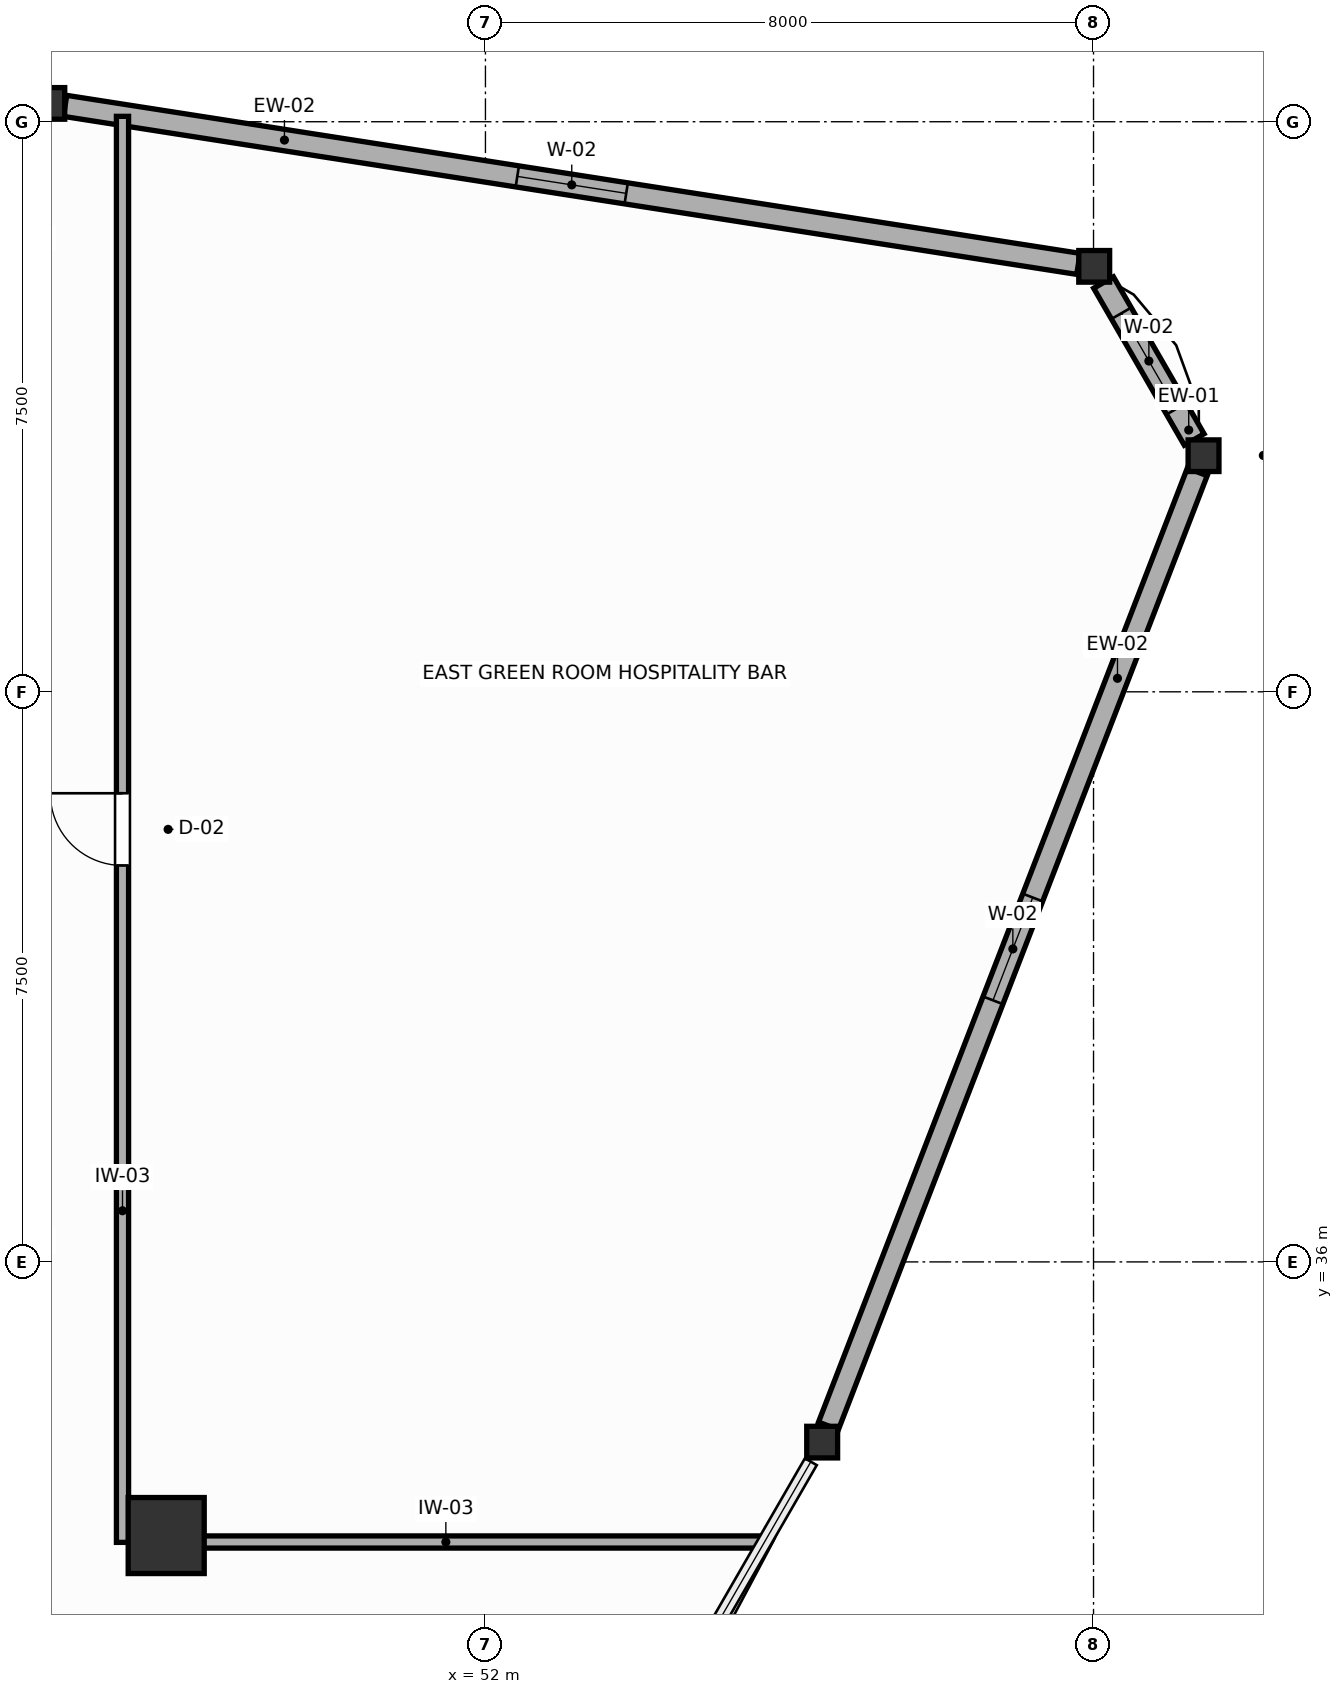
"""IFC4 building model, lengths in metres.
Left out: names, types, materials, properties, quantities, classifications, styles, units other than length and angle.
Written with IfcOpenShell. Run it as: python <this file> out.ifc"""

import sys

from ifc_helpers import new_model, si_unit, direction, frame, frame_2d, origin, origin_2d, place, context, subcontext, project, spatial, rectangle, i_section, extrude, source, transform, mapped, element, fill, save


model = new_model("IFC4")
c1 = context("Model", 3, precision=1e-05, world=origin(), true_north=direction((0.0, 1.0)))
c2 = subcontext(c1, "Body", "Model", "MODEL_VIEW")
j1 = project(units=[si_unit("LENGTHUNIT", "METRE"), si_unit("PLANEANGLEUNIT", "RADIAN")], contexts=[c1])
p1 = place(None, origin())
s1 = spatial("IfcSite", under=j1, at=p1, CompositionType="ELEMENT")
p2 = place(p1, origin())
s2 = spatial("IfcBuilding", under=s1, at=p2, CompositionType="ELEMENT")
p3 = place(p2, frame((0.0, 0.0, 227.4)))
s3 = spatial("IfcBuildingStorey", under=s2, at=p3, CompositionType="ELEMENT", Elevation=227.4)
m1 = source(origin(), c2, "Body", "SweptSolid", [
    extrude(rectangle(XDim=1.0, YDim=1.0, at=origin_2d()), origin(), (0.0, 0.0, 1.0), 3.6),
])
p4 = place(p3, frame((47.8, 32.4, 0.0), z_axis=(0.0, 0.0, 1.0), x_axis=(1.0, 0.0, 0.0)))
e1 = element("IfcColumn", 1, at=p4, inside=s3, PredefinedType="COLUMN", context=c2, shape_type="MappedRepresentation", body=[
    mapped(m1, transform((0.0, 0.0, 0.0), scale=1.0)),
])
m2 = source(origin(), c2, "Body", "SweptSolid", [
    extrude(i_section(OverallWidth=0.406, OverallDepth=0.416, WebThickness=0.027, FlangeThickness=0.044, FilletRadius=0.015, at=origin_2d()), origin(), (0.0, 0.0, 1.0), 3.6),
])
for number, where, z_axis, x_axis in (
    (2, (61.447, 46.606, 0.0), (0.0, 0.0, 1.0), (1.0, 0.0, 0.0)),
    (3, (60.009, 49.098, 0.0), (0.0, 0.0, 1.0), (1.0, 0.0, 0.0)),
    (4, (46.262, 51.241, 0.0), (0.0, 0.0, 1.0), (1.0, 0.0, 0.0)),
    (5, (56.43, 33.629, 0.0), (0.0, 0.0, 1.0), (1.0, 0.0, 0.0)),
):
    element("IfcColumn", number, at=place(p3, frame(where, z_axis=z_axis, x_axis=x_axis)), inside=s3, PredefinedType="COLUMN", context=c2, shape_type="MappedRepresentation", body=[
        mapped(m2, transform((0.0, 0.0, 0.0), scale=1.0)),
    ])
p5 = place(p3, frame((61.324, 46.819, 0.0), z_axis=(0.0, 0.0, 1.0), x_axis=(-0.499938113561, 0.866061130988, 0.0)))
e6 = element("IfcWall", 6, at=p5, inside=s3, PredefinedType="SOLIDWALL", context=c2, shape_type="SweptSolid", body=[
    extrude(rectangle(XDim=2.385, YDim=0.3, at=frame_2d((1.192, 0.0))), origin(), (0.0, 0.0, 1.0), 3.02),
])
p6 = place(p5, frame((0.467, 0.0, 0.75)))
e7 = element("IfcOpeningElement", 7, at=p6, cuts=e6, PredefinedType="OPENING", context=c2, shape_type="SweptSolid", body=[
    extrude(rectangle(XDim=1.45, YDim=1.65, at=frame_2d((0.725, 0.825))), frame((0.0, 0.16, 0.0), z_axis=(0.0, -1.0, 0.0), x_axis=(1.0, 0.0, 0.0)), (0.0, 0.0, 1.0), 0.32),
])
p7 = place(p3, frame((59.801, 49.13, 0.0), z_axis=(0.0, 0.0, 1.0), x_axis=(-0.988058992674, 0.154076042901, 0.0)))
e8 = element("IfcWall", 8, at=p7, inside=s3, PredefinedType="SOLIDWALL", context=c2, shape_type="SweptSolid", body=[
    extrude(rectangle(XDim=13.492, YDim=0.28, at=frame_2d((6.746, 0.0))), origin(), (0.0, 0.0, 1.0), 3.02),
])
p8 = place(p7, frame((6.021, 0.0, 0.75)))
e9 = element("IfcOpeningElement", 9, at=p8, cuts=e8, PredefinedType="OPENING", context=c2, shape_type="SweptSolid", body=[
    extrude(rectangle(XDim=1.45, YDim=1.65, at=frame_2d((0.725, 0.825))), frame((0.0, 0.15, 0.0), z_axis=(0.0, -1.0, 0.0), x_axis=(1.0, 0.0, 0.0)), (0.0, 0.0, 1.0), 0.3),
])
p9 = place(p3, frame((56.512, 33.842, 0.0), z_axis=(0.0, 0.0, 1.0), x_axis=(0.360605208927, 0.932718544522, 0.0)))
e10 = element("IfcWall", 10, at=p9, inside=s3, PredefinedType="SOLIDWALL", context=c2, shape_type="SweptSolid", body=[
    extrude(rectangle(XDim=13.457, YDim=0.28, at=frame_2d((6.728, 0.0))), origin(), (0.0, 0.0, 1.0), 3.02),
])
p10 = place(p9, frame((6.003, 0.0, 0.75)))
e11 = element("IfcOpeningElement", 11, at=p10, cuts=e10, PredefinedType="OPENING", context=c2, shape_type="SweptSolid", body=[
    extrude(rectangle(XDim=1.45, YDim=1.65, at=frame_2d((0.725, 0.825))), frame((0.0, 0.15, 0.0), z_axis=(0.0, -1.0, 0.0), x_axis=(1.0, 0.0, 0.0)), (0.0, 0.0, 1.0), 0.3),
])
p11 = place(p3, frame((47.225, 32.31, 0.0), z_axis=(0.0, 0.0, 1.0), x_axis=(0.0, 1.0, 0.0)))
e12 = element("IfcWall", 12, at=p11, inside=s3, PredefinedType="PARTITIONING", context=c2, shape_type="SweptSolid", body=[
    extrude(rectangle(XDim=18.761, YDim=0.16, at=frame_2d((9.38, 0.0))), origin(), (0.0, 0.0, 1.0), 3.41),
])
p12 = place(p11, frame((8.906, 0.0, 0.0)))
e13 = element("IfcOpeningElement", 13, at=p12, cuts=e12, PredefinedType="OPENING", context=c2, shape_type="SweptSolid", body=[
    extrude(rectangle(XDim=0.95, YDim=2.05, at=frame_2d((0.475, 1.025))), frame((0.0, 0.09, 0.0), z_axis=(0.0, -1.0, 0.0), x_axis=(1.0, 0.0, 0.0)), (0.0, 0.0, 1.0), 0.18),
])
p13 = place(p3, frame((47.307, 32.315, 0.0), z_axis=(0.0, 0.0, 1.0), x_axis=(1.0, 0.0, 0.0)))
e14 = element("IfcWall", 14, at=p13, inside=s3, PredefinedType="PARTITIONING", context=c2, shape_type="SweptSolid", body=[
    extrude(rectangle(XDim=8.344, YDim=0.16, at=frame_2d((4.172, 0.0))), origin(), (0.0, 0.0, 1.0), 2.96),
])
p14 = place(p6, origin())
e15 = element("IfcWindow", 15, at=p14, inside=s3, PartitioningType="SINGLE_PANEL", PredefinedType="WINDOW", context=c2, shape_type="SweptSolid", body=[
    extrude(rectangle(XDim=1.45, YDim=1.65, at=frame_2d((0.725, 0.825))), frame((0.0, 0.03, 0.0), z_axis=(0.0, -1.0, 0.0), x_axis=(1.0, 0.0, 0.0)), (0.0, 0.0, 1.0), 0.06),
])
fill(e7, e15)
p15 = place(p8, origin())
e16 = element("IfcWindow", 16, at=p15, inside=s3, PartitioningType="SINGLE_PANEL", PredefinedType="WINDOW", context=c2, shape_type="SweptSolid", body=[
    extrude(rectangle(XDim=1.45, YDim=1.65, at=frame_2d((0.725, 0.825))), frame((0.0, 0.03, 0.0), z_axis=(0.0, -1.0, 0.0), x_axis=(1.0, 0.0, 0.0)), (0.0, 0.0, 1.0), 0.06),
])
fill(e9, e16)
p16 = place(p10, origin())
e17 = element("IfcWindow", 17, at=p16, inside=s3, PartitioningType="SINGLE_PANEL", PredefinedType="WINDOW", context=c2, shape_type="SweptSolid", body=[
    extrude(rectangle(XDim=1.45, YDim=1.65, at=frame_2d((0.725, 0.825))), frame((0.0, 0.03, 0.0), z_axis=(0.0, -1.0, 0.0), x_axis=(1.0, 0.0, 0.0)), (0.0, 0.0, 1.0), 0.06),
])
fill(e11, e17)
p17 = place(p12, origin())
e18 = element("IfcDoor", 18, at=p17, inside=s3, OperationType="SINGLE_SWING_RIGHT", PredefinedType="DOOR", context=c2, shape_type="SweptSolid", body=[
    extrude(rectangle(XDim=0.95, YDim=2.05, at=frame_2d((0.475, 1.025))), frame((0.0, 0.025, 0.0), z_axis=(0.0, -1.0, 0.0), x_axis=(1.0, 0.0, 0.0)), (0.0, 0.0, 1.0), 0.05),
])
fill(e13, e18)
save(model, sys.argv[1])
